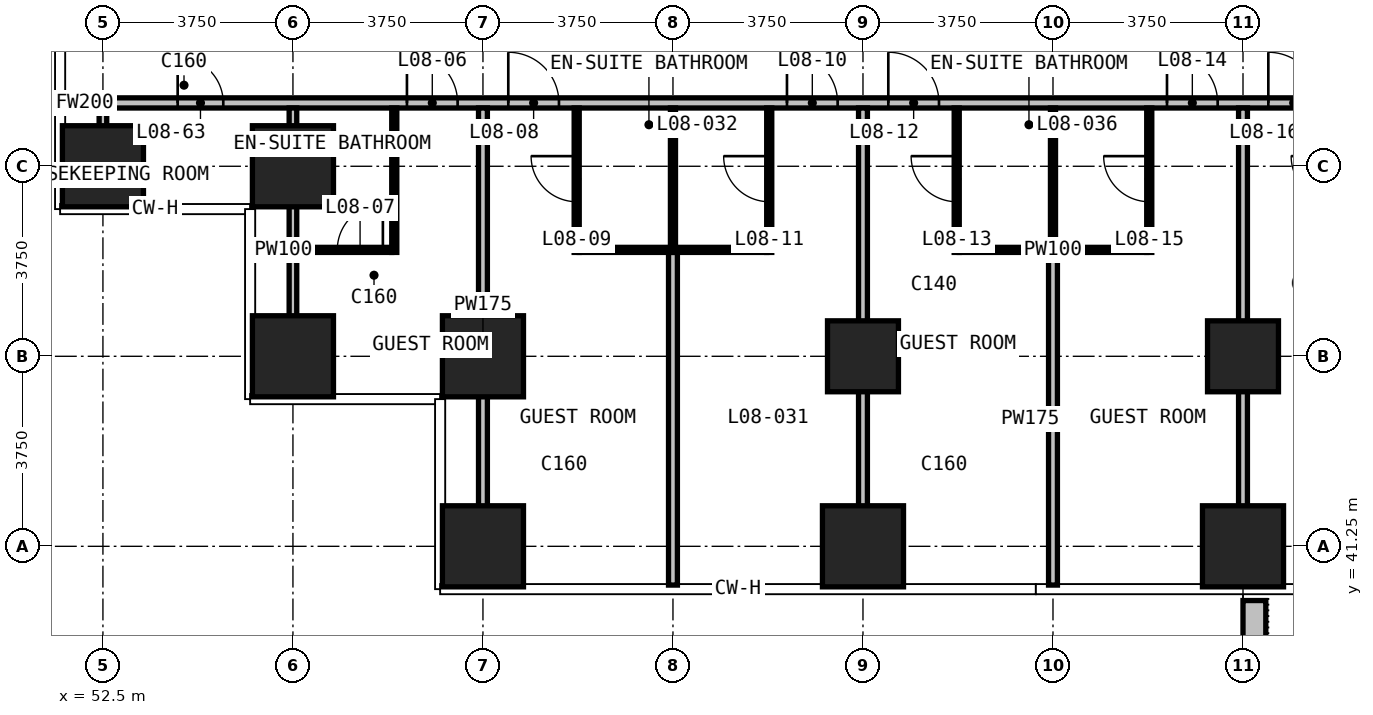
"""IFC4 building model, lengths in metres.
Left out: names, types, materials, properties, quantities, classifications, styles, units other than length and angle.
Written with IfcOpenShell. Run it as: python <this file> out.ifc"""

import sys

from ifc_helpers import new_model, si_unit, direction, frame, frame_2d, origin, origin_2d, place, context, subcontext, project, spatial, rectangle, extrude, element, fill, save


model = new_model("IFC4")
c1 = context("Model", 3, precision=1e-05, world=origin(), true_north=direction((0.0, 1.0)))
c2 = subcontext(c1, "Body", "Model", "MODEL_VIEW")
j1 = project(units=[si_unit("LENGTHUNIT", "METRE"), si_unit("PLANEANGLEUNIT", "RADIAN")], contexts=[c1])
p1 = place(None, origin())
s1 = spatial("IfcSite", under=j1, at=p1, CompositionType="ELEMENT")
p2 = place(p1, origin())
s2 = spatial("IfcBuilding", under=s1, at=p2, CompositionType="ELEMENT")
p3 = place(p2, frame((0.0, 0.0, 46.1)))
s3 = spatial("IfcBuildingStorey", under=s2, at=p3, CompositionType="ELEMENT", Elevation=46.1)
for number, where, z_axis, x_axis in (
    (1, (52.5, 48.75, 0.0), (0.0, 0.0, 1.0), (1.0, 0.0, 0.0)),
    (2, (56.25, 45.0, 0.0), (0.0, 0.0, 1.0), (1.0, 0.0, 0.0)),
    (3, (56.25, 48.75, 0.0), (0.0, 0.0, 1.0), (1.0, 0.0, 0.0)),
    (4, (60.0, 41.25, 0.0), (0.0, 0.0, 1.0), (1.0, 0.0, 0.0)),
    (5, (60.0, 45.0, 0.0), (0.0, 0.0, 1.0), (1.0, 0.0, 0.0)),
    (6, (67.5, 41.25, 0.0), (0.0, 0.0, 1.0), (1.0, 0.0, 0.0)),
):
    element("IfcColumn", number, at=place(p3, frame(where, z_axis=z_axis, x_axis=x_axis)), inside=s3, PredefinedType="COLUMN", context=c2, shape_type="SweptSolid", body=[
        extrude(rectangle(XDim=1.6, YDim=1.6, at=origin_2d()), origin(), (0.0, 0.0, 1.0), 3.3),
    ])
p4 = place(p3, frame((67.5, 45.0, 0.0), z_axis=(0.0, 0.0, 1.0), x_axis=(1.0, 0.0, 0.0)))
e7 = element("IfcColumn", 7, at=p4, inside=s3, PredefinedType="COLUMN", context=c2, shape_type="SweptSolid", body=[
    extrude(rectangle(XDim=1.4, YDim=1.4, at=origin_2d()), origin(), (0.0, 0.0, 1.0), 3.3),
])
p5 = place(p3, frame((75.0, 41.25, 0.0), z_axis=(0.0, 0.0, 1.0), x_axis=(1.0, 0.0, 0.0)))
e8 = element("IfcColumn", 8, at=p5, inside=s3, PredefinedType="COLUMN", context=c2, shape_type="SweptSolid", body=[
    extrude(rectangle(XDim=1.6, YDim=1.6, at=origin_2d()), origin(), (0.0, 0.0, 1.0), 3.3),
])
p6 = place(p3, frame((75.0, 45.0, 0.0), z_axis=(0.0, 0.0, 1.0), x_axis=(1.0, 0.0, 0.0)))
e9 = element("IfcColumn", 9, at=p6, inside=s3, PredefinedType="COLUMN", context=c2, shape_type="SweptSolid", body=[
    extrude(rectangle(XDim=1.4, YDim=1.4, at=origin_2d()), origin(), (0.0, 0.0, 1.0), 3.3),
])
p7 = place(p3, frame((75.225, 40.18, 0.0), z_axis=(0.0, 0.0, 1.0), x_axis=(0.0, -1.0, 0.0)))
e10 = element("IfcWall", 10, at=p7, inside=s3, PredefinedType="USERDEFINED", context=c2, shape_type="SweptSolid", body=[
    extrude(rectangle(XDim=2.33, YDim=0.45, at=frame_2d((1.165, 0.0))), origin(), (0.0, 0.0, 1.0), 1.1),
])
p8 = place(p3, frame((51.855, 50.0, 0.0), z_axis=(0.0, 0.0, 1.0), x_axis=(1.0, 0.0, 0.0)))
e11 = element("IfcWall", 11, at=p8, inside=s3, PredefinedType="PARTITIONING", context=c2, shape_type="SweptSolid", body=[
    extrude(rectangle(XDim=0.57, YDim=0.2, at=frame_2d((0.285, 0.0))), origin(), (0.0, 0.0, 1.0), 3.0),
])
p9 = place(p3, frame((52.575, 50.0, 0.0), z_axis=(0.0, 0.0, 1.0), x_axis=(1.0, 0.0, 0.0)))
e12 = element("IfcWall", 12, at=p9, inside=s3, PredefinedType="PARTITIONING", context=c2, shape_type="SweptSolid", body=[
    extrude(rectangle(XDim=44.85, YDim=0.2, at=frame_2d((22.425, 0.0))), origin(), (0.0, 0.0, 1.0), 3.0),
])
p10 = place(p9, frame((5.925, 0.0, 0.0)))
e13 = element("IfcOpeningElement", 13, at=p10, cuts=e12, PredefinedType="OPENING", context=c2, shape_type="SweptSolid", body=[
    extrude(rectangle(XDim=1.0, YDim=2.2, at=frame_2d((0.5, 1.1))), frame((0.0, 0.11, 0.0), z_axis=(0.0, -1.0, 0.0), x_axis=(1.0, 0.0, 0.0)), (0.0, 0.0, 1.0), 0.22),
])
p11 = place(p9, frame((7.925, 0.0, 0.0)))
e14 = element("IfcOpeningElement", 14, at=p11, cuts=e12, PredefinedType="OPENING", context=c2, shape_type="SweptSolid", body=[
    extrude(rectangle(XDim=1.0, YDim=2.2, at=frame_2d((0.5, 1.1))), frame((0.0, 0.11, 0.0), z_axis=(0.0, -1.0, 0.0), x_axis=(1.0, 0.0, 0.0)), (0.0, 0.0, 1.0), 0.22),
])
p12 = place(p9, frame((13.425, 0.0, 0.0)))
e15 = element("IfcOpeningElement", 15, at=p12, cuts=e12, PredefinedType="OPENING", context=c2, shape_type="SweptSolid", body=[
    extrude(rectangle(XDim=1.0, YDim=2.2, at=frame_2d((0.5, 1.1))), frame((0.0, 0.11, 0.0), z_axis=(0.0, -1.0, 0.0), x_axis=(1.0, 0.0, 0.0)), (0.0, 0.0, 1.0), 0.22),
])
p13 = place(p9, frame((15.425, 0.0, 0.0)))
e16 = element("IfcOpeningElement", 16, at=p13, cuts=e12, PredefinedType="OPENING", context=c2, shape_type="SweptSolid", body=[
    extrude(rectangle(XDim=1.0, YDim=2.2, at=frame_2d((0.5, 1.1))), frame((0.0, 0.11, 0.0), z_axis=(0.0, -1.0, 0.0), x_axis=(1.0, 0.0, 0.0)), (0.0, 0.0, 1.0), 0.22),
])
p14 = place(p9, frame((20.925, 0.0, 0.0)))
e17 = element("IfcOpeningElement", 17, at=p14, cuts=e12, PredefinedType="OPENING", context=c2, shape_type="SweptSolid", body=[
    extrude(rectangle(XDim=1.0, YDim=2.2, at=frame_2d((0.5, 1.1))), frame((0.0, 0.11, 0.0), z_axis=(0.0, -1.0, 0.0), x_axis=(1.0, 0.0, 0.0)), (0.0, 0.0, 1.0), 0.22),
])
p15 = place(p9, frame((22.925, 0.0, 0.0)))
e18 = element("IfcOpeningElement", 18, at=p15, cuts=e12, PredefinedType="OPENING", context=c2, shape_type="SweptSolid", body=[
    extrude(rectangle(XDim=1.0, YDim=2.2, at=frame_2d((0.5, 1.1))), frame((0.0, 0.11, 0.0), z_axis=(0.0, -1.0, 0.0), x_axis=(1.0, 0.0, 0.0)), (0.0, 0.0, 1.0), 0.22),
])
p16 = place(p9, frame((28.425, 0.0, 0.0)))
e19 = element("IfcOpeningElement", 19, at=p16, cuts=e12, PredefinedType="OPENING", context=c2, shape_type="SweptSolid", body=[
    extrude(rectangle(XDim=1.0, YDim=2.2, at=frame_2d((0.5, 1.1))), frame((0.0, 0.11, 0.0), z_axis=(0.0, -1.0, 0.0), x_axis=(1.0, 0.0, 0.0)), (0.0, 0.0, 1.0), 0.22),
])
p17 = place(p9, frame((30.425, 0.0, 0.0)))
e20 = element("IfcOpeningElement", 20, at=p17, cuts=e12, PredefinedType="OPENING", context=c2, shape_type="SweptSolid", body=[
    extrude(rectangle(XDim=1.0, YDim=2.2, at=frame_2d((0.5, 1.1))), frame((0.0, 0.11, 0.0), z_axis=(0.0, -1.0, 0.0), x_axis=(1.0, 0.0, 0.0)), (0.0, 0.0, 1.0), 0.22),
])
p18 = place(p9, frame((35.925, 0.0, 0.0)))
e21 = element("IfcOpeningElement", 21, at=p18, cuts=e12, PredefinedType="OPENING", context=c2, shape_type="SweptSolid", body=[
    extrude(rectangle(XDim=1.0, YDim=2.2, at=frame_2d((0.5, 1.1))), frame((0.0, 0.11, 0.0), z_axis=(0.0, -1.0, 0.0), x_axis=(1.0, 0.0, 0.0)), (0.0, 0.0, 1.0), 0.22),
])
p19 = place(p9, frame((37.925, 0.0, 0.0)))
e22 = element("IfcOpeningElement", 22, at=p19, cuts=e12, PredefinedType="OPENING", context=c2, shape_type="SweptSolid", body=[
    extrude(rectangle(XDim=1.0, YDim=2.2, at=frame_2d((0.5, 1.1))), frame((0.0, 0.11, 0.0), z_axis=(0.0, -1.0, 0.0), x_axis=(1.0, 0.0, 0.0)), (0.0, 0.0, 1.0), 0.22),
])
p20 = place(p9, frame((1.4, 0.0, 0.0)))
e23 = element("IfcOpeningElement", 23, at=p20, cuts=e12, PredefinedType="OPENING", context=c2, shape_type="SweptSolid", body=[
    extrude(rectangle(XDim=0.9, YDim=2.2, at=frame_2d((0.45, 1.1))), frame((0.0, 0.11, 0.0), z_axis=(0.0, -1.0, 0.0), x_axis=(1.0, 0.0, 0.0)), (0.0, 0.0, 1.0), 0.22),
])
p21 = place(p9, frame((42.575, 0.0, 0.0)))
e24 = element("IfcOpeningElement", 24, at=p21, cuts=e12, PredefinedType="OPENING", context=c2, shape_type="SweptSolid", body=[
    extrude(rectangle(XDim=0.9, YDim=2.2, at=frame_2d((0.45, 1.1))), frame((0.0, 0.11, 0.0), z_axis=(0.0, -1.0, 0.0), x_axis=(1.0, 0.0, 0.0)), (0.0, 0.0, 1.0), 0.22),
])
p22 = place(p3, frame((60.0, 40.485, 0.0), z_axis=(0.0, 0.0, 1.0), x_axis=(0.0, 1.0, 0.0)))
e25 = element("IfcWall", 25, at=p22, inside=s3, PredefinedType="PARTITIONING", context=c2, shape_type="SweptSolid", body=[
    extrude(rectangle(XDim=9.415, YDim=0.175, at=frame_2d((4.708, 0.0))), origin(), (0.0, 0.0, 1.0), 3.0),
])
p23 = place(p3, frame((63.75, 40.485, 0.0), z_axis=(0.0, 0.0, 1.0), x_axis=(0.0, 1.0, 0.0)))
e26 = element("IfcWall", 26, at=p23, inside=s3, PredefinedType="PARTITIONING", context=c2, shape_type="SweptSolid", body=[
    extrude(rectangle(XDim=6.565, YDim=0.175, at=frame_2d((3.282, 0.0))), origin(), (0.0, 0.0, 1.0), 3.0),
])
p24 = place(p3, frame((67.5, 40.485, 0.0), z_axis=(0.0, 0.0, 1.0), x_axis=(0.0, 1.0, 0.0)))
e27 = element("IfcWall", 27, at=p24, inside=s3, PredefinedType="PARTITIONING", context=c2, shape_type="SweptSolid", body=[
    extrude(rectangle(XDim=9.415, YDim=0.175, at=frame_2d((4.708, 0.0))), origin(), (0.0, 0.0, 1.0), 3.0),
])
p25 = place(p3, frame((71.25, 40.485, 0.0), z_axis=(0.0, 0.0, 1.0), x_axis=(0.0, 1.0, 0.0)))
e28 = element("IfcWall", 28, at=p25, inside=s3, PredefinedType="PARTITIONING", context=c2, shape_type="SweptSolid", body=[
    extrude(rectangle(XDim=6.565, YDim=0.175, at=frame_2d((3.282, 0.0))), origin(), (0.0, 0.0, 1.0), 3.0),
])
p26 = place(p3, frame((75.0, 40.485, 0.0), z_axis=(0.0, 0.0, 1.0), x_axis=(0.0, 1.0, 0.0)))
e29 = element("IfcWall", 29, at=p26, inside=s3, PredefinedType="PARTITIONING", context=c2, shape_type="SweptSolid", body=[
    extrude(rectangle(XDim=9.415, YDim=0.175, at=frame_2d((4.708, 0.0))), origin(), (0.0, 0.0, 1.0), 3.0),
])
p27 = place(p3, frame((52.5, 48.105, 0.0), z_axis=(0.0, 0.0, 1.0), x_axis=(0.0, 1.0, 0.0)))
e30 = element("IfcWall", 30, at=p27, inside=s3, PredefinedType="PARTITIONING", context=c2, shape_type="SweptSolid", body=[
    extrude(rectangle(XDim=1.995, YDim=0.15, at=frame_2d((0.998, 0.0))), origin(), (0.0, 0.0, 1.0), 3.0),
])
p28 = place(p3, frame((56.25, 44.235, 0.0), z_axis=(0.0, 0.0, 1.0), x_axis=(0.0, 1.0, 0.0)))
e31 = element("IfcWall", 31, at=p28, inside=s3, PredefinedType="PARTITIONING", context=c2, shape_type="SweptSolid", body=[
    extrude(rectangle(XDim=5.665, YDim=0.15, at=frame_2d((2.833, 0.0))), origin(), (0.0, 0.0, 1.0), 3.0),
])
p29 = place(p3, frame((56.325, 47.1, 0.0), z_axis=(0.0, 0.0, 1.0), x_axis=(1.0, 0.0, 0.0)))
e32 = element("IfcWall", 32, at=p29, inside=s3, PredefinedType="PARTITIONING", context=c2, shape_type="SweptSolid", body=[
    extrude(rectangle(XDim=1.875, YDim=0.1, at=frame_2d((0.938, 0.0))), origin(), (0.0, 0.0, 1.0), 3.0),
])
p30 = place(p29, frame((0.8, 0.0, 0.0)))
e33 = element("IfcOpeningElement", 33, at=p30, cuts=e32, PredefinedType="OPENING", context=c2, shape_type="SweptSolid", body=[
    extrude(rectangle(XDim=0.9, YDim=2.2, at=frame_2d((0.45, 1.1))), frame((0.0, 0.06, 0.0), z_axis=(0.0, -1.0, 0.0), x_axis=(1.0, 0.0, 0.0)), (0.0, 0.0, 1.0), 0.12),
])
for number, where, z_axis, x_axis in (
    (34, (61.9, 47.1, 0.0), (0.0, 0.0, 1.0), (1.0, 0.0, 0.0)),
    (35, (69.4, 47.1, 0.0), (0.0, 0.0, 1.0), (1.0, 0.0, 0.0)),
):
    element("IfcWall", number, at=place(p3, frame(where, z_axis=z_axis, x_axis=x_axis)), inside=s3, PredefinedType="PARTITIONING", context=c2, shape_type="SweptSolid", body=[
        extrude(rectangle(XDim=3.7, YDim=0.1, at=frame_2d((1.85, 0.0))), origin(), (0.0, 0.0, 1.0), 3.0),
    ])
p31 = place(p3, frame((58.25, 47.05, 0.0), z_axis=(0.0, 0.0, 1.0), x_axis=(0.0, 1.0, 0.0)))
e36 = element("IfcWall", 36, at=p31, inside=s3, PredefinedType="PARTITIONING", context=c2, shape_type="SweptSolid", body=[
    extrude(rectangle(XDim=2.85, YDim=0.1, at=frame_2d((1.425, 0.0))), origin(), (0.0, 0.0, 1.0), 3.0),
])
p32 = place(p3, frame((61.85, 47.05, 0.0), z_axis=(0.0, 0.0, 1.0), x_axis=(0.0, 1.0, 0.0)))
e37 = element("IfcWall", 37, at=p32, inside=s3, PredefinedType="PARTITIONING", context=c2, shape_type="SweptSolid", body=[
    extrude(rectangle(XDim=2.85, YDim=0.1, at=frame_2d((1.425, 0.0))), origin(), (0.0, 0.0, 1.0), 3.0),
])
p33 = place(p32, frame((1.0, 0.0, 0.0)))
e38 = element("IfcOpeningElement", 38, at=p33, cuts=e37, PredefinedType="OPENING", context=c2, shape_type="SweptSolid", body=[
    extrude(rectangle(XDim=0.9, YDim=2.2, at=frame_2d((0.45, 1.1))), frame((0.0, 0.06, 0.0), z_axis=(0.0, -1.0, 0.0), x_axis=(1.0, 0.0, 0.0)), (0.0, 0.0, 1.0), 0.12),
])
p34 = place(p3, frame((63.75, 47.15, 0.0), z_axis=(0.0, 0.0, 1.0), x_axis=(0.0, 1.0, 0.0)))
e39 = element("IfcWall", 39, at=p34, inside=s3, PredefinedType="PARTITIONING", context=c2, shape_type="SweptSolid", body=[
    extrude(rectangle(XDim=2.75, YDim=0.1, at=frame_2d((1.375, 0.0))), origin(), (0.0, 0.0, 1.0), 3.0),
])
p35 = place(p3, frame((65.65, 47.05, 0.0), z_axis=(0.0, 0.0, 1.0), x_axis=(0.0, 1.0, 0.0)))
e40 = element("IfcWall", 40, at=p35, inside=s3, PredefinedType="PARTITIONING", context=c2, shape_type="SweptSolid", body=[
    extrude(rectangle(XDim=2.85, YDim=0.1, at=frame_2d((1.425, 0.0))), origin(), (0.0, 0.0, 1.0), 3.0),
])
p36 = place(p35, frame((1.0, 0.0, 0.0)))
e41 = element("IfcOpeningElement", 41, at=p36, cuts=e40, PredefinedType="OPENING", context=c2, shape_type="SweptSolid", body=[
    extrude(rectangle(XDim=0.9, YDim=2.2, at=frame_2d((0.45, 1.1))), frame((0.0, 0.06, 0.0), z_axis=(0.0, -1.0, 0.0), x_axis=(1.0, 0.0, 0.0)), (0.0, 0.0, 1.0), 0.12),
])
p37 = place(p3, frame((69.35, 47.05, 0.0), z_axis=(0.0, 0.0, 1.0), x_axis=(0.0, 1.0, 0.0)))
e42 = element("IfcWall", 42, at=p37, inside=s3, PredefinedType="PARTITIONING", context=c2, shape_type="SweptSolid", body=[
    extrude(rectangle(XDim=2.85, YDim=0.1, at=frame_2d((1.425, 0.0))), origin(), (0.0, 0.0, 1.0), 3.0),
])
p38 = place(p37, frame((1.0, 0.0, 0.0)))
e43 = element("IfcOpeningElement", 43, at=p38, cuts=e42, PredefinedType="OPENING", context=c2, shape_type="SweptSolid", body=[
    extrude(rectangle(XDim=0.9, YDim=2.2, at=frame_2d((0.45, 1.1))), frame((0.0, 0.06, 0.0), z_axis=(0.0, -1.0, 0.0), x_axis=(1.0, 0.0, 0.0)), (0.0, 0.0, 1.0), 0.12),
])
p39 = place(p3, frame((71.25, 47.15, 0.0), z_axis=(0.0, 0.0, 1.0), x_axis=(0.0, 1.0, 0.0)))
e44 = element("IfcWall", 44, at=p39, inside=s3, PredefinedType="PARTITIONING", context=c2, shape_type="SweptSolid", body=[
    extrude(rectangle(XDim=2.75, YDim=0.1, at=frame_2d((1.375, 0.0))), origin(), (0.0, 0.0, 1.0), 3.0),
])
p40 = place(p3, frame((73.15, 47.05, 0.0), z_axis=(0.0, 0.0, 1.0), x_axis=(0.0, 1.0, 0.0)))
e45 = element("IfcWall", 45, at=p40, inside=s3, PredefinedType="PARTITIONING", context=c2, shape_type="SweptSolid", body=[
    extrude(rectangle(XDim=2.85, YDim=0.1, at=frame_2d((1.425, 0.0))), origin(), (0.0, 0.0, 1.0), 3.0),
])
p41 = place(p40, frame((1.0, 0.0, 0.0)))
e46 = element("IfcOpeningElement", 46, at=p41, cuts=e45, PredefinedType="OPENING", context=c2, shape_type="SweptSolid", body=[
    extrude(rectangle(XDim=0.9, YDim=2.2, at=frame_2d((0.45, 1.1))), frame((0.0, 0.06, 0.0), z_axis=(0.0, -1.0, 0.0), x_axis=(1.0, 0.0, 0.0)), (0.0, 0.0, 1.0), 0.12),
])
p42 = place(p10, origin())
e47 = element("IfcDoor", 47, at=p42, inside=s3, OperationType="SINGLE_SWING_RIGHT", PredefinedType="DOOR", context=c2, shape_type="SweptSolid", body=[
    extrude(rectangle(XDim=1.0, YDim=2.2, at=frame_2d((0.5, 1.1))), frame((0.0, 0.025, 0.0), z_axis=(0.0, -1.0, 0.0), x_axis=(1.0, 0.0, 0.0)), (0.0, 0.0, 1.0), 0.05),
])
fill(e13, e47)
p43 = place(p30, origin())
e48 = element("IfcDoor", 48, at=p43, inside=s3, OperationType="SINGLE_SWING_RIGHT", PredefinedType="DOOR", context=c2, shape_type="SweptSolid", body=[
    extrude(rectangle(XDim=0.9, YDim=2.2, at=frame_2d((0.45, 1.1))), frame((0.0, 0.025, 0.0), z_axis=(0.0, -1.0, 0.0), x_axis=(1.0, 0.0, 0.0)), (0.0, 0.0, 1.0), 0.05),
])
fill(e33, e48)
p44 = place(p11, origin())
e49 = element("IfcDoor", 49, at=p44, inside=s3, OperationType="SINGLE_SWING_RIGHT", PredefinedType="DOOR", context=c2, shape_type="SweptSolid", body=[
    extrude(rectangle(XDim=1.0, YDim=2.2, at=frame_2d((0.5, 1.1))), frame((0.0, 0.025, 0.0), z_axis=(0.0, -1.0, 0.0), x_axis=(1.0, 0.0, 0.0)), (0.0, 0.0, 1.0), 0.05),
])
fill(e14, e49)
p45 = place(p33, origin())
e50 = element("IfcDoor", 50, at=p45, inside=s3, OperationType="SINGLE_SWING_RIGHT", PredefinedType="DOOR", context=c2, shape_type="SweptSolid", body=[
    extrude(rectangle(XDim=0.9, YDim=2.2, at=frame_2d((0.45, 1.1))), frame((0.0, 0.025, 0.0), z_axis=(0.0, -1.0, 0.0), x_axis=(1.0, 0.0, 0.0)), (0.0, 0.0, 1.0), 0.05),
])
fill(e38, e50)
p46 = place(p12, origin())
e51 = element("IfcDoor", 51, at=p46, inside=s3, OperationType="SINGLE_SWING_LEFT", PredefinedType="DOOR", context=c2, shape_type="SweptSolid", body=[
    extrude(rectangle(XDim=1.0, YDim=2.2, at=frame_2d((0.5, 1.1))), frame((0.0, 0.025, 0.0), z_axis=(0.0, -1.0, 0.0), x_axis=(1.0, 0.0, 0.0)), (0.0, 0.0, 1.0), 0.05),
])
fill(e15, e51)
p47 = place(p36, origin())
e52 = element("IfcDoor", 52, at=p47, inside=s3, OperationType="SINGLE_SWING_RIGHT", PredefinedType="DOOR", context=c2, shape_type="SweptSolid", body=[
    extrude(rectangle(XDim=0.9, YDim=2.2, at=frame_2d((0.45, 1.1))), frame((0.0, 0.025, 0.0), z_axis=(0.0, -1.0, 0.0), x_axis=(1.0, 0.0, 0.0)), (0.0, 0.0, 1.0), 0.05),
])
fill(e41, e52)
p48 = place(p13, origin())
e53 = element("IfcDoor", 53, at=p48, inside=s3, OperationType="SINGLE_SWING_RIGHT", PredefinedType="DOOR", context=c2, shape_type="SweptSolid", body=[
    extrude(rectangle(XDim=1.0, YDim=2.2, at=frame_2d((0.5, 1.1))), frame((0.0, 0.025, 0.0), z_axis=(0.0, -1.0, 0.0), x_axis=(1.0, 0.0, 0.0)), (0.0, 0.0, 1.0), 0.05),
])
fill(e16, e53)
p49 = place(p38, origin())
e54 = element("IfcDoor", 54, at=p49, inside=s3, OperationType="SINGLE_SWING_RIGHT", PredefinedType="DOOR", context=c2, shape_type="SweptSolid", body=[
    extrude(rectangle(XDim=0.9, YDim=2.2, at=frame_2d((0.45, 1.1))), frame((0.0, 0.025, 0.0), z_axis=(0.0, -1.0, 0.0), x_axis=(1.0, 0.0, 0.0)), (0.0, 0.0, 1.0), 0.05),
])
fill(e43, e54)
p50 = place(p14, origin())
e55 = element("IfcDoor", 55, at=p50, inside=s3, OperationType="SINGLE_SWING_LEFT", PredefinedType="DOOR", context=c2, shape_type="SweptSolid", body=[
    extrude(rectangle(XDim=1.0, YDim=2.2, at=frame_2d((0.5, 1.1))), frame((0.0, 0.025, 0.0), z_axis=(0.0, -1.0, 0.0), x_axis=(1.0, 0.0, 0.0)), (0.0, 0.0, 1.0), 0.05),
])
fill(e17, e55)
p51 = place(p41, origin())
e56 = element("IfcDoor", 56, at=p51, inside=s3, OperationType="SINGLE_SWING_RIGHT", PredefinedType="DOOR", context=c2, shape_type="SweptSolid", body=[
    extrude(rectangle(XDim=0.9, YDim=2.2, at=frame_2d((0.45, 1.1))), frame((0.0, 0.025, 0.0), z_axis=(0.0, -1.0, 0.0), x_axis=(1.0, 0.0, 0.0)), (0.0, 0.0, 1.0), 0.05),
])
fill(e46, e56)
p52 = place(p15, origin())
e57 = element("IfcDoor", 57, at=p52, inside=s3, OperationType="SINGLE_SWING_LEFT", PredefinedType="DOOR", context=c2, shape_type="SweptSolid", body=[
    extrude(rectangle(XDim=1.0, YDim=2.2, at=frame_2d((0.5, 1.1))), frame((0.0, 0.025, 0.0), z_axis=(0.0, -1.0, 0.0), x_axis=(1.0, 0.0, 0.0)), (0.0, 0.0, 1.0), 0.05),
])
fill(e18, e57)
p53 = place(p20, origin())
e58 = element("IfcDoor", 58, at=p53, inside=s3, OperationType="SINGLE_SWING_RIGHT", PredefinedType="DOOR", context=c2, shape_type="SweptSolid", body=[
    extrude(rectangle(XDim=0.9, YDim=2.2, at=frame_2d((0.45, 1.1))), frame((0.0, 0.025, 0.0), z_axis=(0.0, -1.0, 0.0), x_axis=(1.0, 0.0, 0.0)), (0.0, 0.0, 1.0), 0.05),
])
fill(e23, e58)
save(model, sys.argv[1])
